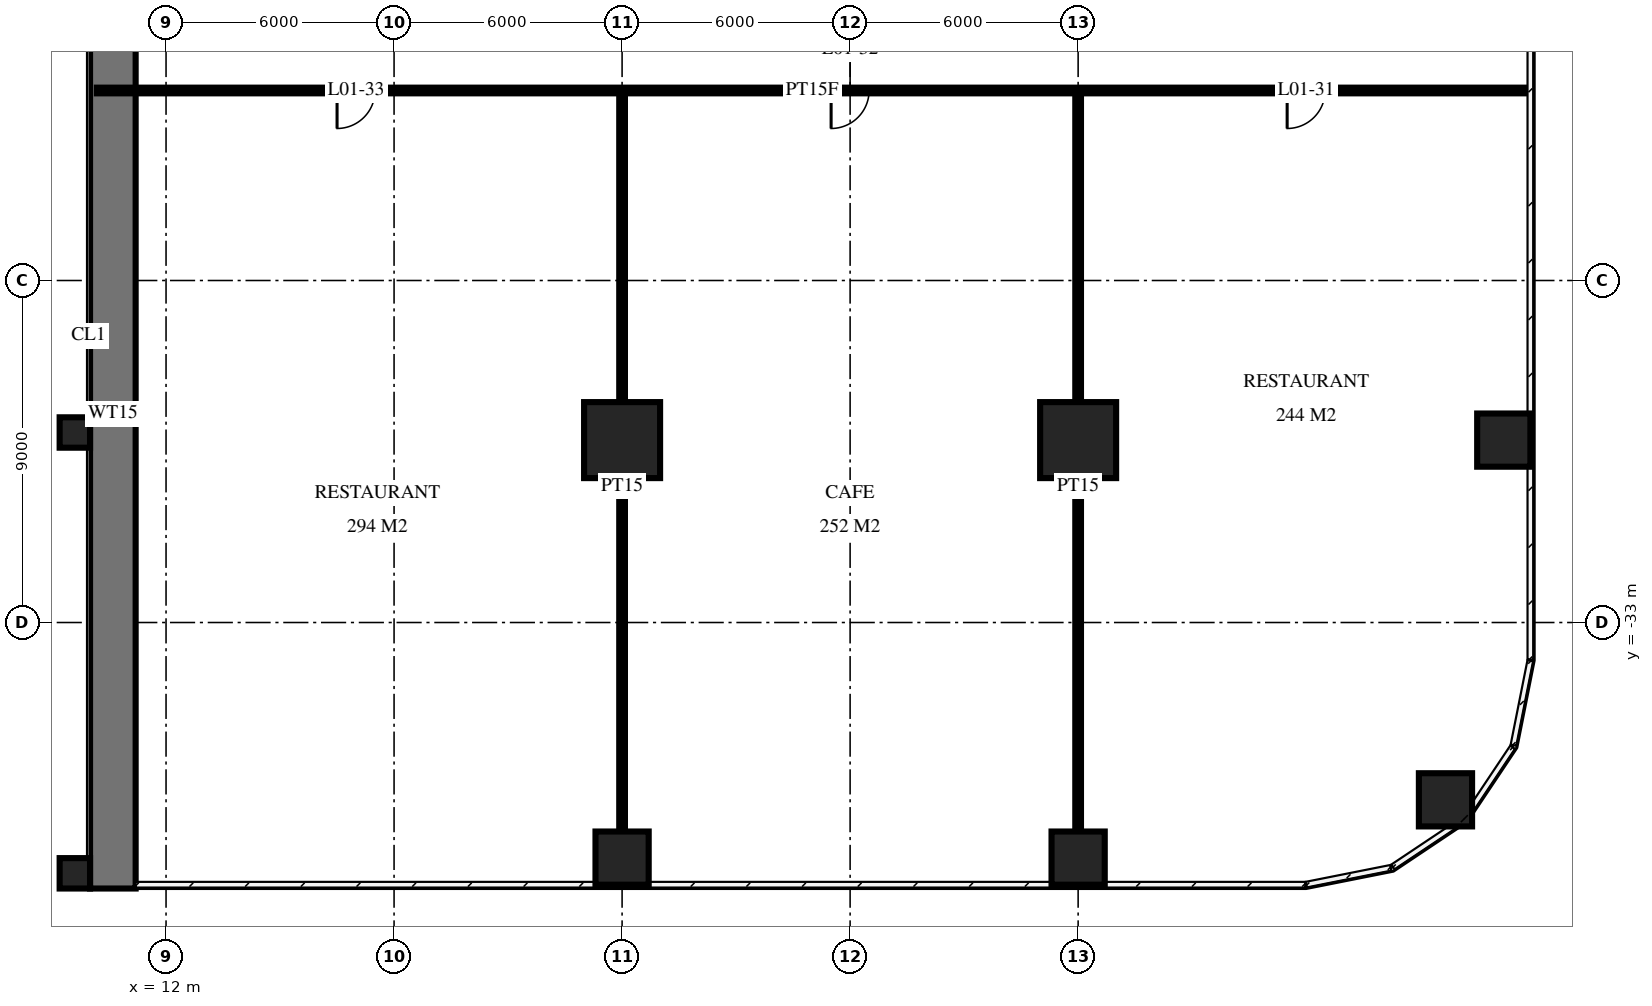
"""IFC4 building model, lengths in metres.
Left out: names, types, materials, properties, quantities, classifications, styles, units other than length and angle.
Written with IfcOpenShell. Run it as: python <this file> out.ifc"""

import sys

from ifc_helpers import new_model, si_unit, direction, frame, frame_2d, origin, origin_2d, place, context, subcontext, project, spatial, rectangle, circle, extrude, element, fill, save


model = new_model("IFC4")
c1 = context("Model", 3, precision=1e-05, world=origin(), true_north=direction((0.0, 1.0)))
c2 = subcontext(c1, "Body", "Model", "MODEL_VIEW")
j1 = project(units=[si_unit("LENGTHUNIT", "METRE"), si_unit("PLANEANGLEUNIT", "RADIAN")], contexts=[c1])
p1 = place(None, origin())
s1 = spatial("IfcSite", under=j1, at=p1, CompositionType="ELEMENT")
p2 = place(p1, origin())
s2 = spatial("IfcBuilding", under=s1, at=p2, CompositionType="ELEMENT")
p3 = place(p2, frame((0.0, 0.0, 7.0)))
s3 = spatial("IfcBuildingStorey", under=s2, at=p3, CompositionType="ELEMENT", Elevation=7.0)
p4 = place(p3, frame((24.0, -39.2, 0.0), z_axis=(0.0, 0.0, 1.0), x_axis=(1.0, 0.0, 0.0)))
e1 = element("IfcColumn", 1, at=p4, inside=s3, PredefinedType="COLUMN", context=c2, shape_type="SweptSolid", body=[
    extrude(circle(Radius=0.7, at=origin_2d()), origin(), (0.0, 0.0, 1.0), 5.5),
])
p5 = place(p3, frame((24.0, -28.2, 0.0), z_axis=(0.0, 0.0, 1.0), x_axis=(1.0, 0.0, 0.0)))
e2 = element("IfcColumn", 2, at=p5, inside=s3, PredefinedType="COLUMN", context=c2, shape_type="SweptSolid", body=[
    extrude(circle(Radius=1.0, at=origin_2d()), origin(), (0.0, 0.0, 1.0), 5.5),
])
p6 = place(p3, frame((36.0, -39.2, 0.0), z_axis=(0.0, 0.0, 1.0), x_axis=(1.0, 0.0, 0.0)))
e3 = element("IfcColumn", 3, at=p6, inside=s3, PredefinedType="COLUMN", context=c2, shape_type="SweptSolid", body=[
    extrude(circle(Radius=0.7, at=origin_2d()), origin(), (0.0, 0.0, 1.0), 5.5),
])
p7 = place(p3, frame((36.0, -28.2, 0.0), z_axis=(0.0, 0.0, 1.0), x_axis=(1.0, 0.0, 0.0)))
e4 = element("IfcColumn", 4, at=p7, inside=s3, PredefinedType="COLUMN", context=c2, shape_type="SweptSolid", body=[
    extrude(circle(Radius=1.0, at=origin_2d()), origin(), (0.0, 0.0, 1.0), 5.5),
])
for number, where, z_axis, x_axis in (
    (5, (45.666, -37.666, 0.0), (0.0, 0.0, 1.0), (1.0, 0.0, 0.0)),
    (6, (47.2, -28.2, 0.0), (0.0, 0.0, 1.0), (1.0, 0.0, 0.0)),
):
    element("IfcColumn", number, at=place(p3, frame(where, z_axis=z_axis, x_axis=x_axis)), inside=s3, PredefinedType="COLUMN", context=c2, shape_type="SweptSolid", body=[
        extrude(circle(Radius=0.7, at=origin_2d()), origin(), (0.0, 0.0, 1.0), 5.5),
    ])
p8 = place(p3, frame((10.6, -40.0, 0.0), z_axis=(0.0, 0.0, 1.0), x_axis=(0.0, 1.0, 0.0)))
e7 = element("IfcWall", 7, at=p8, inside=s3, PredefinedType="SHEAR", context=c2, shape_type="SweptSolid", body=[
    extrude(rectangle(XDim=25.0, YDim=1.2, at=frame_2d((12.5, 0.0))), origin(), (0.0, 0.0, 1.0), 5.5),
])
for number, where, z_axis, x_axis in (
    (8, (9.6, -39.6, 0.0), (0.0, 0.0, 1.0), (1.0, 0.0, 0.0)),
    (9, (9.6, -28.0, 0.0), (0.0, 0.0, 1.0), (1.0, 0.0, 0.0)),
):
    element("IfcColumn", number, at=place(p3, frame(where, z_axis=z_axis, x_axis=x_axis)), inside=s3, PredefinedType="COLUMN", context=c2, shape_type="SweptSolid", body=[
        extrude(rectangle(XDim=0.8, YDim=0.8, at=origin_2d()), origin(), (0.0, 0.0, 1.0), 5.5),
    ])
for number, where, z_axis, x_axis in (
    (10, (36.0, -39.82, 0.0), (0.0, 0.0, 1.0), (0.0, 1.0, 0.0)),
    (11, (24.0, -39.82, 0.0), (0.0, 0.0, 1.0), (0.0, 1.0, 0.0)),
):
    element("IfcWall", number, at=place(p3, frame(where, z_axis=z_axis, x_axis=x_axis)), inside=s3, PredefinedType="PARTITIONING", context=c2, shape_type="SweptSolid", body=[
        extrude(rectangle(XDim=20.82, YDim=0.15, at=frame_2d((10.41, 0.0))), origin(), (0.0, 0.0, 1.0), 5.05),
    ])
p9 = place(p3, frame((10.18, -19.0, 0.0), z_axis=(0.0, 0.0, 1.0), x_axis=(1.0, 0.0, 0.0)))
e12 = element("IfcWall", 12, at=p9, inside=s3, PredefinedType="PARTITIONING", context=c2, shape_type="SweptSolid", body=[
    extrude(rectangle(XDim=37.64, YDim=0.15, at=frame_2d((18.82, 0.0))), origin(), (0.0, 0.0, 1.0), 5.05),
])
p10 = place(p9, frame((31.32, 0.0, 0.0)))
e13 = element("IfcOpeningElement", 13, at=p10, cuts=e12, PredefinedType="OPENING", context=c2, shape_type="SweptSolid", body=[
    extrude(rectangle(XDim=1.0, YDim=2.1, at=frame_2d((0.5, 1.05))), frame((0.0, 0.085, 0.0), z_axis=(0.0, -1.0, 0.0), x_axis=(1.0, 0.0, 0.0)), (0.0, 0.0, 1.0), 0.17),
])
p11 = place(p9, frame((19.32, 0.0, 0.0)))
e14 = element("IfcOpeningElement", 14, at=p11, cuts=e12, PredefinedType="OPENING", context=c2, shape_type="SweptSolid", body=[
    extrude(rectangle(XDim=1.0, YDim=2.1, at=frame_2d((0.5, 1.05))), frame((0.0, 0.085, 0.0), z_axis=(0.0, -1.0, 0.0), x_axis=(1.0, 0.0, 0.0)), (0.0, 0.0, 1.0), 0.17),
])
p12 = place(p9, frame((6.32, 0.0, 0.0)))
e15 = element("IfcOpeningElement", 15, at=p12, cuts=e12, PredefinedType="OPENING", context=c2, shape_type="SweptSolid", body=[
    extrude(rectangle(XDim=1.0, YDim=2.1, at=frame_2d((0.5, 1.05))), frame((0.0, 0.085, 0.0), z_axis=(0.0, -1.0, 0.0), x_axis=(1.0, 0.0, 0.0)), (0.0, 0.0, 1.0), 0.17),
])
p13 = place(p10, frame((0.5, 0.0, 0.0), z_axis=(0.0, 0.0, 1.0), x_axis=(-1.0, 0.0, 0.0)))
e16 = element("IfcDoor", 16, at=p13, inside=s3, OperationType="SINGLE_SWING_LEFT", PredefinedType="DOOR", context=c2, shape_type="SweptSolid", body=[
    extrude(rectangle(XDim=1.0, YDim=2.1, at=frame_2d((0.0, 1.05))), frame((0.0, -0.025, 0.0), z_axis=(0.0, 1.0, 0.0), x_axis=(-1.0, 0.0, 0.0)), (0.0, 0.0, 1.0), 0.05),
])
fill(e13, e16)
p14 = place(p11, frame((0.5, 0.0, 0.0), z_axis=(0.0, 0.0, 1.0), x_axis=(-1.0, 0.0, 0.0)))
e17 = element("IfcDoor", 17, at=p14, inside=s3, OperationType="SINGLE_SWING_LEFT", PredefinedType="DOOR", context=c2, shape_type="SweptSolid", body=[
    extrude(rectangle(XDim=1.0, YDim=2.1, at=frame_2d((0.0, 1.05))), frame((0.0, -0.025, 0.0), z_axis=(0.0, 1.0, 0.0), x_axis=(-1.0, 0.0, 0.0)), (0.0, 0.0, 1.0), 0.05),
])
fill(e14, e17)
p15 = place(p12, frame((0.5, 0.0, 0.0), z_axis=(0.0, 0.0, 1.0), x_axis=(-1.0, 0.0, 0.0)))
e18 = element("IfcDoor", 18, at=p15, inside=s3, OperationType="SINGLE_SWING_LEFT", PredefinedType="DOOR", context=c2, shape_type="SweptSolid", body=[
    extrude(rectangle(XDim=1.0, YDim=2.1, at=frame_2d((0.0, 1.05))), frame((0.0, -0.025, 0.0), z_axis=(0.0, 1.0, 0.0), x_axis=(-1.0, 0.0, 0.0)), (0.0, 0.0, 1.0), 0.05),
])
fill(e15, e18)
save(model, sys.argv[1])
